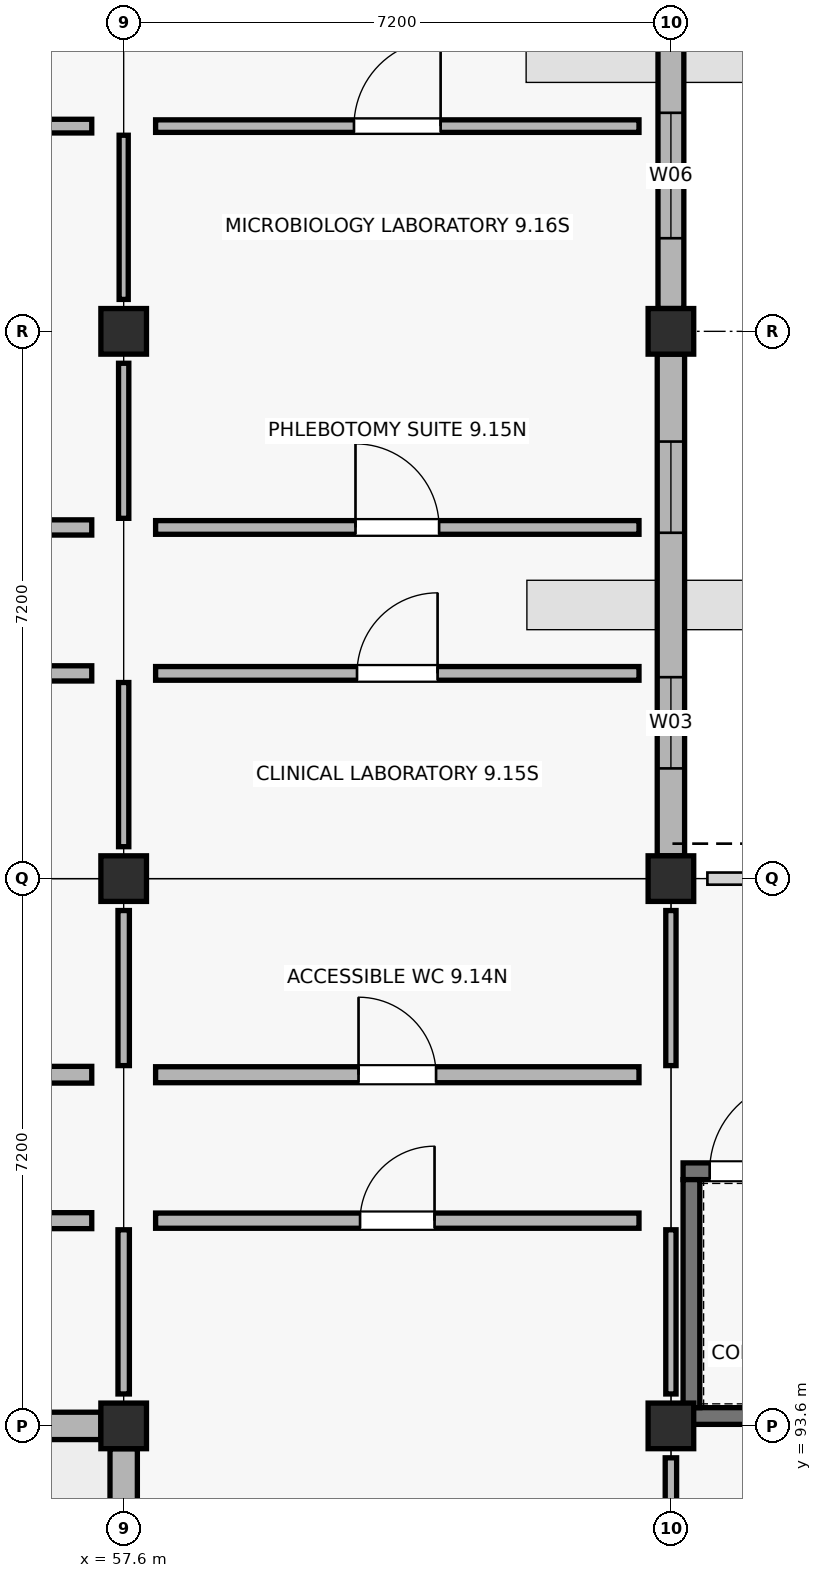
"""IFC4 building model, lengths in metres.
Left out: names, types, materials, properties, quantities, classifications, styles, units other than length and angle.
Written with IfcOpenShell. Run it as: python <this file> out.ifc"""

import sys

from ifc_helpers import new_model, si_unit, direction, frame, frame_2d, origin, origin_2d, place, context, subcontext, project, spatial, rectangle, extrude, element, fill, save


model = new_model("IFC4")
c1 = context("Model", 3, precision=1e-05, world=origin(), true_north=direction((0.0, 1.0)))
c2 = subcontext(c1, "Body", "Model", "MODEL_VIEW")
j1 = project(units=[si_unit("LENGTHUNIT", "METRE"), si_unit("PLANEANGLEUNIT", "RADIAN")], contexts=[c1])
p1 = place(None, origin())
s1 = spatial("IfcSite", under=j1, at=p1, CompositionType="ELEMENT")
p2 = place(p1, origin())
s2 = spatial("IfcBuilding", under=s1, at=p2, CompositionType="ELEMENT")
p3 = place(p2, origin())
s3 = spatial("IfcBuildingStorey", under=s2, at=p3, CompositionType="ELEMENT", Elevation=0.0)
for number, where, z_axis, x_axis in (
    (1, (57.6, 93.6, -0.25), (0.0, 0.0, 1.0), (1.0, 0.0, 0.0)),
    (2, (57.6, 100.8, -0.25), (0.0, 0.0, 1.0), (1.0, 0.0, 0.0)),
    (3, (57.6, 108.0, -0.25), (0.0, 0.0, 1.0), (1.0, 0.0, 0.0)),
    (4, (64.8, 93.6, -0.25), (0.0, 0.0, 1.0), (1.0, 0.0, 0.0)),
    (5, (64.8, 100.8, -0.25), (0.0, 0.0, 1.0), (1.0, 0.0, 0.0)),
    (6, (64.8, 108.0, -0.25), (0.0, 0.0, 1.0), (1.0, 0.0, 0.0)),
):
    element("IfcColumn", number, at=place(p3, frame(where, z_axis=z_axis, x_axis=x_axis)), inside=s3, PredefinedType="COLUMN", context=c2, shape_type="SweptSolid", body=[
        extrude(rectangle(XDim=0.6, YDim=0.6, at=origin_2d()), origin(), (0.0, 0.0, 1.0), 4.75),
    ])
p4 = place(p3, frame((50.7, 93.6, 0.0), z_axis=(0.0, 0.0, 1.0), x_axis=(1.0, 0.0, 0.0)))
e7 = element("IfcWall", 7, at=p4, inside=s3, PredefinedType="SOLIDWALL", context=c2, shape_type="SweptSolid", body=[
    extrude(rectangle(XDim=6.6, YDim=0.36, at=frame_2d((3.3, 0.0))), origin(), (0.0, 0.0, 1.0), 3.47),
])
p5 = place(p4, frame((0.675, 0.0, 0.9)))
e8 = element("IfcOpeningElement", 8, at=p5, cuts=e7, PredefinedType="OPENING", context=c2, shape_type="SweptSolid", body=[
    extrude(rectangle(XDim=2.15, YDim=1.75, at=frame_2d((1.075, 0.875))), frame((0.0, 0.19, 0.0), z_axis=(0.0, -1.0, 0.0), x_axis=(1.0, 0.0, 0.0)), (0.0, 0.0, 1.0), 0.38),
])
p6 = place(p4, frame((3.775, 0.0, 0.9)))
e9 = element("IfcOpeningElement", 9, at=p6, cuts=e7, PredefinedType="OPENING", context=c2, shape_type="SweptSolid", body=[
    extrude(rectangle(XDim=2.15, YDim=1.75, at=frame_2d((1.075, 0.875))), frame((0.0, 0.19, 0.0), z_axis=(0.0, -1.0, 0.0), x_axis=(1.0, 0.0, 0.0)), (0.0, 0.0, 1.0), 0.38),
])
p7 = place(p3, frame((57.6, 93.3, 0.0), z_axis=(0.0, 0.0, 1.0), x_axis=(0.0, -1.0, 0.0)))
e10 = element("IfcWall", 10, at=p7, inside=s3, PredefinedType="SOLIDWALL", context=c2, shape_type="SweptSolid", body=[
    extrude(rectangle(XDim=6.6, YDim=0.36, at=frame_2d((3.3, 0.0))), origin(), (0.0, 0.0, 1.0), 3.52),
])
p8 = place(p7, frame((0.775, 0.0, 0.9)))
e11 = element("IfcOpeningElement", 11, at=p8, cuts=e10, PredefinedType="OPENING", context=c2, shape_type="SweptSolid", body=[
    extrude(rectangle(XDim=1.95, YDim=1.88, at=frame_2d((0.975, 0.94))), frame((0.0, 0.19, 0.0), z_axis=(0.0, -1.0, 0.0), x_axis=(1.0, 0.0, 0.0)), (0.0, 0.0, 1.0), 0.38),
])
p9 = place(p7, frame((3.875, 0.0, 0.9)))
e12 = element("IfcOpeningElement", 12, at=p9, cuts=e10, PredefinedType="OPENING", context=c2, shape_type="SweptSolid", body=[
    extrude(rectangle(XDim=1.95, YDim=1.88, at=frame_2d((0.975, 0.94))), frame((0.0, 0.19, 0.0), z_axis=(0.0, -1.0, 0.0), x_axis=(1.0, 0.0, 0.0)), (0.0, 0.0, 1.0), 0.38),
])
p10 = place(p3, frame((64.8, 101.1, 0.0), z_axis=(0.0, 0.0, 1.0), x_axis=(0.0, 1.0, 0.0)))
e13 = element("IfcWall", 13, at=p10, inside=s3, PredefinedType="SOLIDWALL", context=c2, shape_type="SweptSolid", body=[
    extrude(rectangle(XDim=6.6, YDim=0.36, at=frame_2d((3.3, 0.0))), origin(), (0.0, 0.0, 1.0), 3.52),
])
p11 = place(p10, frame((1.15, 0.0, 0.9)))
e14 = element("IfcOpeningElement", 14, at=p11, cuts=e13, PredefinedType="OPENING", context=c2, shape_type="SweptSolid", body=[
    extrude(rectangle(XDim=1.2, YDim=1.25, at=frame_2d((0.6, 0.625))), frame((0.0, 0.19, 0.0), z_axis=(0.0, -1.0, 0.0), x_axis=(1.0, 0.0, 0.0)), (0.0, 0.0, 1.0), 0.38),
])
p12 = place(p10, frame((4.25, 0.0, 0.9)))
e15 = element("IfcOpeningElement", 15, at=p12, cuts=e13, PredefinedType="OPENING", context=c2, shape_type="SweptSolid", body=[
    extrude(rectangle(XDim=1.2, YDim=1.25, at=frame_2d((0.6, 0.625))), frame((0.0, 0.19, 0.0), z_axis=(0.0, -1.0, 0.0), x_axis=(1.0, 0.0, 0.0)), (0.0, 0.0, 1.0), 0.38),
])
p13 = place(p3, frame((64.8, 108.3, 0.0), z_axis=(0.0, 0.0, 1.0), x_axis=(0.0, 1.0, 0.0)))
e16 = element("IfcWall", 16, at=p13, inside=s3, PredefinedType="SOLIDWALL", context=c2, shape_type="SweptSolid", body=[
    extrude(rectangle(XDim=6.6, YDim=0.34, at=frame_2d((3.3, 0.0))), origin(), (0.0, 0.0, 1.0), 3.52),
])
p14 = place(p13, frame((0.925, 0.0, 0.9)))
e17 = element("IfcOpeningElement", 17, at=p14, cuts=e16, PredefinedType="OPENING", context=c2, shape_type="SweptSolid", body=[
    extrude(rectangle(XDim=1.65, YDim=1.25, at=frame_2d((0.825, 0.625))), frame((0.0, 0.18, 0.0), z_axis=(0.0, -1.0, 0.0), x_axis=(1.0, 0.0, 0.0)), (0.0, 0.0, 1.0), 0.36),
])
p15 = place(p13, frame((4.025, 0.0, 0.9)))
e18 = element("IfcOpeningElement", 18, at=p15, cuts=e16, PredefinedType="OPENING", context=c2, shape_type="SweptSolid", body=[
    extrude(rectangle(XDim=1.65, YDim=1.25, at=frame_2d((0.825, 0.625))), frame((0.0, 0.18, 0.0), z_axis=(0.0, -1.0, 0.0), x_axis=(1.0, 0.0, 0.0)), (0.0, 0.0, 1.0), 0.36),
])
p16 = place(p3, frame((64.96, 93.73, -0.25), z_axis=(0.0, 0.0, 1.0), x_axis=(1.0, 0.0, 0.0)))
e19 = element("IfcWall", 19, at=p16, inside=s3, PredefinedType="SHEAR", context=c2, shape_type="SweptSolid", body=[
    extrude(rectangle(XDim=6.88, YDim=0.22, at=frame_2d((3.44, 0.0))), origin(), (0.0, 0.0, 1.0), 4.47),
])
p17 = place(p3, frame((64.96, 96.95, -0.25), z_axis=(0.0, 0.0, 1.0), x_axis=(1.0, 0.0, 0.0)))
e20 = element("IfcWall", 20, at=p17, inside=s3, PredefinedType="SHEAR", context=c2, shape_type="SweptSolid", body=[
    extrude(rectangle(XDim=6.88, YDim=0.22, at=frame_2d((3.44, 0.0))), origin(), (0.0, 0.0, 1.0), 4.47),
])
p18 = place(p17, frame((0.35, 0.0, 0.25)))
e21 = element("IfcOpeningElement", 21, at=p18, cuts=e20, PredefinedType="OPENING", context=c2, shape_type="SweptSolid", body=[
    extrude(rectangle(XDim=1.2, YDim=2.15, at=frame_2d((0.6, 1.075))), frame((0.0, 0.12, 0.0), z_axis=(0.0, -1.0, 0.0), x_axis=(1.0, 0.0, 0.0)), (0.0, 0.0, 1.0), 0.24),
])
p19 = place(p3, frame((65.07, 93.84, -0.25), z_axis=(0.0, 0.0, 1.0), x_axis=(0.0, 1.0, 0.0)))
e22 = element("IfcWall", 22, at=p19, inside=s3, PredefinedType="SHEAR", context=c2, shape_type="SweptSolid", body=[
    extrude(rectangle(XDim=3.0, YDim=0.22, at=frame_2d((1.5, 0.0))), origin(), (0.0, 0.0, 1.0), 4.47),
])
p20 = place(p3, frame((50.82, 96.3, 0.0), z_axis=(0.0, 0.0, 1.0), x_axis=(1.0, 0.0, 0.0)))
e23 = element("IfcWall", 23, at=p20, inside=s3, PredefinedType="PLUMBINGWALL", context=c2, shape_type="SweptSolid", body=[
    extrude(rectangle(XDim=6.36, YDim=0.21, at=frame_2d((3.18, 0.0))), origin(), (0.0, 0.0, 1.0), 3.36),
])
p21 = place(p20, frame((2.53, 0.0, 0.0)))
e24 = element("IfcOpeningElement", 24, at=p21, cuts=e23, PredefinedType="OPENING", context=c2, shape_type="SweptSolid", body=[
    extrude(rectangle(XDim=1.3, YDim=2.14, at=frame_2d((0.65, 1.07))), frame((0.0, 0.115, 0.0), z_axis=(0.0, -1.0, 0.0), x_axis=(1.0, 0.0, 0.0)), (0.0, 0.0, 1.0), 0.23),
])
p22 = place(p3, frame((57.6, 94.02, 0.0), z_axis=(0.0, 0.0, 1.0), x_axis=(0.0, 1.0, 0.0)))
e25 = element("IfcWall", 25, at=p22, inside=s3, PredefinedType="PARTITIONING", context=c2, shape_type="SweptSolid", body=[
    extrude(rectangle(XDim=2.16, YDim=0.15, at=frame_2d((1.08, 0.0))), origin(), (0.0, 0.0, 1.0), 3.36),
])
p23 = place(p3, frame((50.82, 98.22, 0.0), z_axis=(0.0, 0.0, 1.0), x_axis=(1.0, 0.0, 0.0)))
e26 = element("IfcWall", 26, at=p23, inside=s3, PredefinedType="SOLIDWALL", context=c2, shape_type="SweptSolid", body=[
    extrude(rectangle(XDim=6.36, YDim=0.22, at=frame_2d((3.18, 0.0))), origin(), (0.0, 0.0, 1.0), 3.36),
])
p24 = place(p23, frame((2.51, 0.0, 0.0)))
e27 = element("IfcOpeningElement", 27, at=p24, cuts=e26, PredefinedType="OPENING", context=c2, shape_type="SweptSolid", body=[
    extrude(rectangle(XDim=1.34, YDim=2.14, at=frame_2d((0.67, 1.07))), frame((0.0, 0.12, 0.0), z_axis=(0.0, -1.0, 0.0), x_axis=(1.0, 0.0, 0.0)), (0.0, 0.0, 1.0), 0.24),
])
p25 = place(p3, frame((57.6, 98.34, 0.0), z_axis=(0.0, 0.0, 1.0), x_axis=(0.0, 1.0, 0.0)))
e28 = element("IfcWall", 28, at=p25, inside=s3, PredefinedType="PARTITIONING", context=c2, shape_type="SweptSolid", body=[
    extrude(rectangle(XDim=2.04, YDim=0.15, at=frame_2d((1.02, 0.0))), origin(), (0.0, 0.0, 1.0), 3.36),
])
p26 = place(p3, frame((50.82, 103.5, 0.0), z_axis=(0.0, 0.0, 1.0), x_axis=(1.0, 0.0, 0.0)))
e29 = element("IfcWall", 29, at=p26, inside=s3, PredefinedType="SOLIDWALL", context=c2, shape_type="SweptSolid", body=[
    extrude(rectangle(XDim=6.36, YDim=0.2, at=frame_2d((3.18, 0.0))), origin(), (0.0, 0.0, 1.0), 3.36),
])
p27 = place(p26, frame((2.49, 0.0, 0.0)))
e30 = element("IfcOpeningElement", 30, at=p27, cuts=e29, PredefinedType="OPENING", context=c2, shape_type="SweptSolid", body=[
    extrude(rectangle(XDim=1.38, YDim=2.14, at=frame_2d((0.69, 1.07))), frame((0.0, 0.11, 0.0), z_axis=(0.0, -1.0, 0.0), x_axis=(1.0, 0.0, 0.0)), (0.0, 0.0, 1.0), 0.22),
])
p28 = place(p3, frame((57.6, 101.22, 0.0), z_axis=(0.0, 0.0, 1.0), x_axis=(0.0, 1.0, 0.0)))
e31 = element("IfcWall", 31, at=p28, inside=s3, PredefinedType="PARTITIONING", context=c2, shape_type="SweptSolid", body=[
    extrude(rectangle(XDim=2.16, YDim=0.135, at=frame_2d((1.08, 0.0))), origin(), (0.0, 0.0, 1.0), 3.36),
])
p29 = place(p3, frame((50.82, 105.42, 0.0), z_axis=(0.0, 0.0, 1.0), x_axis=(1.0, 0.0, 0.0)))
e32 = element("IfcWall", 32, at=p29, inside=s3, PredefinedType="SOLIDWALL", context=c2, shape_type="SweptSolid", body=[
    extrude(rectangle(XDim=6.36, YDim=0.2, at=frame_2d((3.18, 0.0))), origin(), (0.0, 0.0, 1.0), 3.36),
])
p30 = place(p29, frame((2.47, 0.0, 0.0)))
e33 = element("IfcOpeningElement", 33, at=p30, cuts=e32, PredefinedType="OPENING", context=c2, shape_type="SweptSolid", body=[
    extrude(rectangle(XDim=1.42, YDim=2.14, at=frame_2d((0.71, 1.07))), frame((0.0, 0.11, 0.0), z_axis=(0.0, -1.0, 0.0), x_axis=(1.0, 0.0, 0.0)), (0.0, 0.0, 1.0), 0.22),
])
p31 = place(p3, frame((57.6, 105.54, 0.0), z_axis=(0.0, 0.0, 1.0), x_axis=(0.0, 1.0, 0.0)))
e34 = element("IfcWall", 34, at=p31, inside=s3, PredefinedType="PARTITIONING", context=c2, shape_type="SweptSolid", body=[
    extrude(rectangle(XDim=2.04, YDim=0.135, at=frame_2d((1.02, 0.0))), origin(), (0.0, 0.0, 1.0), 3.36),
])
p32 = place(p3, frame((50.82, 110.7, 0.0), z_axis=(0.0, 0.0, 1.0), x_axis=(1.0, 0.0, 0.0)))
e35 = element("IfcWall", 35, at=p32, inside=s3, PredefinedType="PARTITIONING", context=c2, shape_type="SweptSolid", body=[
    extrude(rectangle(XDim=6.36, YDim=0.18, at=frame_2d((3.18, 0.0))), origin(), (0.0, 0.0, 1.0), 3.36),
])
p33 = place(p32, frame((2.45, 0.0, 0.0)))
e36 = element("IfcOpeningElement", 36, at=p33, cuts=e35, PredefinedType="OPENING", context=c2, shape_type="SweptSolid", body=[
    extrude(rectangle(XDim=1.46, YDim=2.14, at=frame_2d((0.73, 1.07))), frame((0.0, 0.1, 0.0), z_axis=(0.0, -1.0, 0.0), x_axis=(1.0, 0.0, 0.0)), (0.0, 0.0, 1.0), 0.2),
])
p34 = place(p3, frame((57.6, 108.42, 0.0), z_axis=(0.0, 0.0, 1.0), x_axis=(0.0, 1.0, 0.0)))
e37 = element("IfcWall", 37, at=p34, inside=s3, PredefinedType="PARTITIONING", context=c2, shape_type="SweptSolid", body=[
    extrude(rectangle(XDim=2.16, YDim=0.12, at=frame_2d((1.08, 0.0))), origin(), (0.0, 0.0, 1.0), 3.36),
])
p35 = place(p3, frame((64.8, 91.14, 0.0), z_axis=(0.0, 0.0, 1.0), x_axis=(0.0, 1.0, 0.0)))
e38 = element("IfcWall", 38, at=p35, inside=s3, PredefinedType="PARTITIONING", context=c2, shape_type="SweptSolid", body=[
    extrude(rectangle(XDim=2.04, YDim=0.15, at=frame_2d((1.02, 0.0))), origin(), (0.0, 0.0, 1.0), 3.36),
])
p36 = place(p3, frame((58.02, 96.3, 0.0), z_axis=(0.0, 0.0, 1.0), x_axis=(1.0, 0.0, 0.0)))
e39 = element("IfcWall", 39, at=p36, inside=s3, PredefinedType="SOLIDWALL", context=c2, shape_type="SweptSolid", body=[
    extrude(rectangle(XDim=6.36, YDim=0.2, at=frame_2d((3.18, 0.0))), origin(), (0.0, 0.0, 1.0), 3.36),
])
p37 = place(p36, frame((2.69, 0.0, 0.0)))
e40 = element("IfcOpeningElement", 40, at=p37, cuts=e39, PredefinedType="OPENING", context=c2, shape_type="SweptSolid", body=[
    extrude(rectangle(XDim=0.98, YDim=2.19, at=frame_2d((0.49, 1.095))), frame((0.0, 0.11, 0.0), z_axis=(0.0, -1.0, 0.0), x_axis=(1.0, 0.0, 0.0)), (0.0, 0.0, 1.0), 0.22),
])
p38 = place(p3, frame((64.8, 94.02, 0.0), z_axis=(0.0, 0.0, 1.0), x_axis=(0.0, 1.0, 0.0)))
e41 = element("IfcWall", 41, at=p38, inside=s3, PredefinedType="PARTITIONING", context=c2, shape_type="SweptSolid", body=[
    extrude(rectangle(XDim=2.16, YDim=0.135, at=frame_2d((1.08, 0.0))), origin(), (0.0, 0.0, 1.0), 3.36),
])
p39 = place(p3, frame((58.02, 98.22, 0.0), z_axis=(0.0, 0.0, 1.0), x_axis=(1.0, 0.0, 0.0)))
e42 = element("IfcWall", 42, at=p39, inside=s3, PredefinedType="PLUMBINGWALL", context=c2, shape_type="SweptSolid", body=[
    extrude(rectangle(XDim=6.36, YDim=0.21, at=frame_2d((3.18, 0.0))), origin(), (0.0, 0.0, 1.0), 3.36),
])
p40 = place(p39, frame((2.67, 0.0, 0.0)))
e43 = element("IfcOpeningElement", 43, at=p40, cuts=e42, PredefinedType="OPENING", context=c2, shape_type="SweptSolid", body=[
    extrude(rectangle(XDim=1.02, YDim=2.19, at=frame_2d((0.51, 1.095))), frame((0.0, 0.115, 0.0), z_axis=(0.0, -1.0, 0.0), x_axis=(1.0, 0.0, 0.0)), (0.0, 0.0, 1.0), 0.23),
])
p41 = place(p3, frame((64.8, 98.34, 0.0), z_axis=(0.0, 0.0, 1.0), x_axis=(0.0, 1.0, 0.0)))
e44 = element("IfcWall", 44, at=p41, inside=s3, PredefinedType="PARTITIONING", context=c2, shape_type="SweptSolid", body=[
    extrude(rectangle(XDim=2.04, YDim=0.135, at=frame_2d((1.02, 0.0))), origin(), (0.0, 0.0, 1.0), 3.36),
])
p42 = place(p3, frame((58.02, 103.5, 0.0), z_axis=(0.0, 0.0, 1.0), x_axis=(1.0, 0.0, 0.0)))
e45 = element("IfcWall", 45, at=p42, inside=s3, PredefinedType="PARTITIONING", context=c2, shape_type="SweptSolid", body=[
    extrude(rectangle(XDim=6.36, YDim=0.18, at=frame_2d((3.18, 0.0))), origin(), (0.0, 0.0, 1.0), 3.36),
])
p43 = place(p42, frame((2.65, 0.0, 0.0)))
e46 = element("IfcOpeningElement", 46, at=p43, cuts=e45, PredefinedType="OPENING", context=c2, shape_type="SweptSolid", body=[
    extrude(rectangle(XDim=1.06, YDim=2.19, at=frame_2d((0.53, 1.095))), frame((0.0, 0.1, 0.0), z_axis=(0.0, -1.0, 0.0), x_axis=(1.0, 0.0, 0.0)), (0.0, 0.0, 1.0), 0.2),
])
p44 = place(p3, frame((58.02, 105.42, 0.0), z_axis=(0.0, 0.0, 1.0), x_axis=(1.0, 0.0, 0.0)))
e47 = element("IfcWall", 47, at=p44, inside=s3, PredefinedType="PARTITIONING", context=c2, shape_type="SweptSolid", body=[
    extrude(rectangle(XDim=6.36, YDim=0.18, at=frame_2d((3.18, 0.0))), origin(), (0.0, 0.0, 1.0), 3.36),
])
p45 = place(p44, frame((2.63, 0.0, 0.0)))
e48 = element("IfcOpeningElement", 48, at=p45, cuts=e47, PredefinedType="OPENING", context=c2, shape_type="SweptSolid", body=[
    extrude(rectangle(XDim=1.1, YDim=2.19, at=frame_2d((0.55, 1.095))), frame((0.0, 0.1, 0.0), z_axis=(0.0, -1.0, 0.0), x_axis=(1.0, 0.0, 0.0)), (0.0, 0.0, 1.0), 0.2),
])
p46 = place(p3, frame((58.02, 110.7, 0.0), z_axis=(0.0, 0.0, 1.0), x_axis=(1.0, 0.0, 0.0)))
e49 = element("IfcWall", 49, at=p46, inside=s3, PredefinedType="PARTITIONING", context=c2, shape_type="SweptSolid", body=[
    extrude(rectangle(XDim=6.36, YDim=0.165, at=frame_2d((3.18, 0.0))), origin(), (0.0, 0.0, 1.0), 3.36),
])
p47 = place(p46, frame((2.61, 0.0, 0.0)))
e50 = element("IfcOpeningElement", 50, at=p47, cuts=e49, PredefinedType="OPENING", context=c2, shape_type="SweptSolid", body=[
    extrude(rectangle(XDim=1.14, YDim=2.19, at=frame_2d((0.57, 1.095))), frame((0.0, 0.093, 0.0), z_axis=(0.0, -1.0, 0.0), x_axis=(1.0, 0.0, 0.0)), (0.0, 0.0, 1.0), 0.185),
])
p48 = place(p11, origin())
e51 = element("IfcWindow", 51, at=p48, inside=s3, PartitioningType="SINGLE_PANEL", PredefinedType="WINDOW", context=c2, shape_type="SweptSolid", body=[
    extrude(rectangle(XDim=1.2, YDim=1.25, at=frame_2d((0.6, 0.625))), frame((0.0, 0.03, 0.0), z_axis=(0.0, -1.0, 0.0), x_axis=(1.0, 0.0, 0.0)), (0.0, 0.0, 1.0), 0.06),
])
fill(e14, e51)
p49 = place(p12, origin())
e52 = element("IfcWindow", 52, at=p49, inside=s3, PartitioningType="SINGLE_PANEL", PredefinedType="WINDOW", context=c2, shape_type="SweptSolid", body=[
    extrude(rectangle(XDim=1.2, YDim=1.25, at=frame_2d((0.6, 0.625))), frame((0.0, 0.03, 0.0), z_axis=(0.0, -1.0, 0.0), x_axis=(1.0, 0.0, 0.0)), (0.0, 0.0, 1.0), 0.06),
])
fill(e15, e52)
p50 = place(p14, origin())
e53 = element("IfcWindow", 53, at=p50, inside=s3, PartitioningType="SINGLE_PANEL", PredefinedType="WINDOW", context=c2, shape_type="SweptSolid", body=[
    extrude(rectangle(XDim=1.65, YDim=1.25, at=frame_2d((0.825, 0.625))), frame((0.0, 0.03, 0.0), z_axis=(0.0, -1.0, 0.0), x_axis=(1.0, 0.0, 0.0)), (0.0, 0.0, 1.0), 0.06),
])
fill(e17, e53)
p51 = place(p18, origin())
e54 = element("IfcDoor", 54, at=p51, inside=s3, OperationType="SINGLE_SWING_RIGHT", PredefinedType="DOOR", context=c2, shape_type="SweptSolid", body=[
    extrude(rectangle(XDim=1.2, YDim=2.15, at=frame_2d((0.6, 1.075))), frame((0.0, 0.025, 0.0), z_axis=(0.0, -1.0, 0.0), x_axis=(1.0, 0.0, 0.0)), (0.0, 0.0, 1.0), 0.05),
])
fill(e21, e54)
p52 = place(p37, origin())
e55 = element("IfcDoor", 55, at=p52, inside=s3, OperationType="SINGLE_SWING_RIGHT", PredefinedType="DOOR", context=c2, shape_type="SweptSolid", body=[
    extrude(rectangle(XDim=0.98, YDim=2.19, at=frame_2d((0.49, 1.095))), frame((0.0, 0.025, 0.0), z_axis=(0.0, -1.0, 0.0), x_axis=(1.0, 0.0, 0.0)), (0.0, 0.0, 1.0), 0.05),
])
fill(e40, e55)
p53 = place(p40, origin())
e56 = element("IfcDoor", 56, at=p53, inside=s3, OperationType="SINGLE_SWING_LEFT", PredefinedType="DOOR", context=c2, shape_type="SweptSolid", body=[
    extrude(rectangle(XDim=1.02, YDim=2.19, at=frame_2d((0.51, 1.095))), frame((0.0, 0.025, 0.0), z_axis=(0.0, -1.0, 0.0), x_axis=(1.0, 0.0, 0.0)), (0.0, 0.0, 1.0), 0.05),
])
fill(e43, e56)
p54 = place(p43, origin())
e57 = element("IfcDoor", 57, at=p54, inside=s3, OperationType="SINGLE_SWING_RIGHT", PredefinedType="DOOR", context=c2, shape_type="SweptSolid", body=[
    extrude(rectangle(XDim=1.06, YDim=2.19, at=frame_2d((0.53, 1.095))), frame((0.0, 0.025, 0.0), z_axis=(0.0, -1.0, 0.0), x_axis=(1.0, 0.0, 0.0)), (0.0, 0.0, 1.0), 0.05),
])
fill(e46, e57)
p55 = place(p45, origin())
e58 = element("IfcDoor", 58, at=p55, inside=s3, OperationType="SINGLE_SWING_LEFT", PredefinedType="DOOR", context=c2, shape_type="SweptSolid", body=[
    extrude(rectangle(XDim=1.1, YDim=2.19, at=frame_2d((0.55, 1.095))), frame((0.0, 0.025, 0.0), z_axis=(0.0, -1.0, 0.0), x_axis=(1.0, 0.0, 0.0)), (0.0, 0.0, 1.0), 0.05),
])
fill(e48, e58)
p56 = place(p47, origin())
e59 = element("IfcDoor", 59, at=p56, inside=s3, OperationType="SINGLE_SWING_RIGHT", PredefinedType="DOOR", context=c2, shape_type="SweptSolid", body=[
    extrude(rectangle(XDim=1.14, YDim=2.19, at=frame_2d((0.57, 1.095))), frame((0.0, 0.025, 0.0), z_axis=(0.0, -1.0, 0.0), x_axis=(1.0, 0.0, 0.0)), (0.0, 0.0, 1.0), 0.05),
])
fill(e50, e59)
save(model, sys.argv[1])
